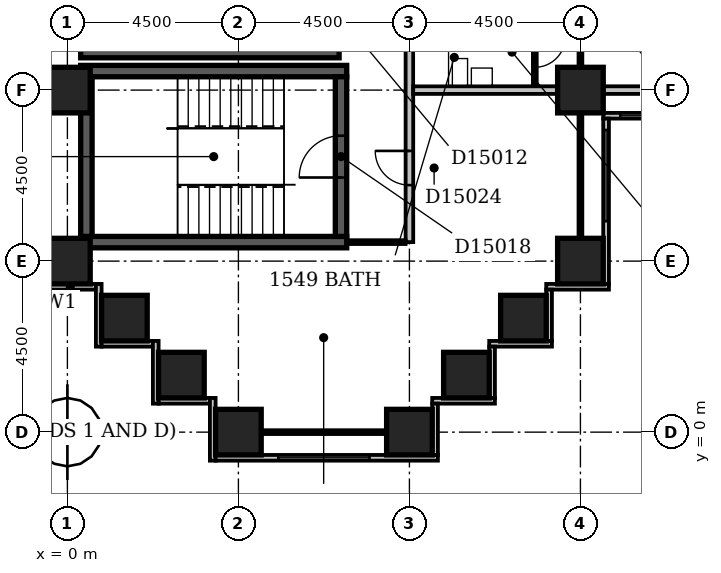
"""IFC4 building model, lengths in metres.
Left out: names, types, materials, properties, quantities, classifications, styles, units other than length and angle.
Written with IfcOpenShell. Run it as: python <this file> out.ifc"""

import sys

from ifc_helpers import new_model, si_unit, direction, frame, frame_2d, origin, origin_2d, place, context, subcontext, project, spatial, rectangle, extrude, element, fill, save


model = new_model("IFC4")
c1 = context("Model", 3, precision=1e-05, world=origin(), true_north=direction((0.0, 1.0)))
c2 = subcontext(c1, "Body", "Model", "MODEL_VIEW")
j1 = project(units=[si_unit("LENGTHUNIT", "METRE"), si_unit("PLANEANGLEUNIT", "RADIAN")], contexts=[c1])
p1 = place(None, origin())
s1 = spatial("IfcSite", under=j1, at=p1, CompositionType="ELEMENT")
p2 = place(p1, origin())
s2 = spatial("IfcBuilding", under=s1, at=p2, CompositionType="ELEMENT")
p3 = place(p2, frame((0.0, 0.0, 65.0)))
s3 = spatial("IfcBuildingStorey", under=s2, at=p3, CompositionType="ELEMENT", Elevation=65.0)
for number, where, z_axis, x_axis in (
    (1, (0.35, 5.0, -0.3), (0.0, 0.0, 1.0), (1.0, 0.0, 0.0)),
    (2, (0.35, 9.5, -0.3), (0.0, 0.0, 1.0), (1.0, 0.0, 0.0)),
):
    element("IfcWall", number, at=place(p3, frame(where, z_axis=z_axis, x_axis=x_axis)), inside=s3, PredefinedType="SHEAR", context=c2, shape_type="SweptSolid", body=[
        extrude(rectangle(XDim=7.0, YDim=0.3, at=frame_2d((3.5, 0.0))), origin(), (0.0, 0.0, 1.0), 3.6),
    ])
p4 = place(p3, frame((0.35, 10.0, -0.3), z_axis=(0.0, 0.0, 1.0), x_axis=(1.0, 0.0, 0.0)))
e3 = element("IfcWall", 3, at=p4, inside=s3, PredefinedType="SHEAR", context=c2, shape_type="SweptSolid", body=[
    extrude(rectangle(XDim=6.8, YDim=0.3, at=frame_2d((3.4, 0.0))), origin(), (0.0, 0.0, 1.0), 3.6),
])
p5 = place(p3, frame((0.5, 5.15, -0.3), z_axis=(0.0, 0.0, 1.0), x_axis=(0.0, 1.0, 0.0)))
e4 = element("IfcWall", 4, at=p5, inside=s3, PredefinedType="SHEAR", context=c2, shape_type="SweptSolid", body=[
    extrude(rectangle(XDim=4.2, YDim=0.3, at=frame_2d((2.1, 0.0))), origin(), (0.0, 0.0, 1.0), 3.6),
])
p6 = place(p3, frame((7.2, 5.15, -0.3), z_axis=(0.0, 0.0, 1.0), x_axis=(0.0, 1.0, 0.0)))
e5 = element("IfcWall", 5, at=p6, inside=s3, PredefinedType="SHEAR", context=c2, shape_type="SweptSolid", body=[
    extrude(rectangle(XDim=4.2, YDim=0.3, at=frame_2d((2.1, 0.0))), origin(), (0.0, 0.0, 1.0), 3.6),
])
p7 = place(p6, frame((1.55, 0.0, 0.3)))
e6 = element("IfcOpeningElement", 6, at=p7, cuts=e5, PredefinedType="OPENING", context=c2, shape_type="SweptSolid", body=[
    extrude(rectangle(XDim=1.1, YDim=2.1, at=frame_2d((0.55, 1.05))), frame((0.0, 0.162, 0.0), z_axis=(0.0, -1.0, 0.0), x_axis=(1.0, 0.0, 0.0)), (0.0, 0.0, 1.0), 0.324),
])
for number, where, z_axis, x_axis in (
    (7, (4.5, 0.0, -0.3), (0.0, 0.0, 1.0), (1.0, 0.0, 0.0)),
    (8, (9.0, 0.0, -0.3), (0.0, 0.0, 1.0), (1.0, 0.0, 0.0)),
    (9, (3.0, 1.5, -0.3), (0.0, 0.0, 1.0), (1.0, 0.0, 0.0)),
    (10, (10.5, 1.5, -0.3), (0.0, 0.0, 1.0), (1.0, 0.0, 0.0)),
    (11, (1.5, 3.0, -0.3), (0.0, 0.0, 1.0), (1.0, 0.0, 0.0)),
    (12, (12.0, 3.0, -0.3), (0.0, 0.0, 1.0), (1.0, 0.0, 0.0)),
    (13, (0.0, 4.5, -0.3), (0.0, 0.0, 1.0), (1.0, 0.0, 0.0)),
    (14, (13.5, 4.5, -0.3), (0.0, 0.0, 1.0), (1.0, 0.0, 0.0)),
    (15, (0.0, 9.0, -0.3), (0.0, 0.0, 1.0), (1.0, 0.0, 0.0)),
    (16, (13.5, 9.0, -0.3), (0.0, 0.0, 1.0), (1.0, 0.0, 0.0)),
):
    element("IfcColumn", number, at=place(p3, frame(where, z_axis=z_axis, x_axis=x_axis)), inside=s3, PredefinedType="COLUMN", context=c2, shape_type="SweptSolid", body=[
        extrude(rectangle(XDim=1.2, YDim=1.2, at=origin_2d()), origin(), (0.0, 0.0, 1.0), 3.6),
    ])
p8 = place(p3, frame((9.675, -0.6, 0.0), z_axis=(0.0, 0.0, 1.0), x_axis=(0.0, 1.0, 0.0)))
e17 = element("IfcWall", 17, at=p8, inside=s3, PredefinedType="STANDARD", context=c2, shape_type="SweptSolid", body=[
    extrude(rectangle(XDim=1.35, YDim=0.15, at=frame_2d((0.675, 0.0))), origin(), (0.0, 0.0, 1.0), 2.7),
])
p9 = place(p3, frame((9.6, 0.825, 0.0), z_axis=(0.0, 0.0, 1.0), x_axis=(1.0, 0.0, 0.0)))
e18 = element("IfcWall", 18, at=p9, inside=s3, PredefinedType="STANDARD", context=c2, shape_type="SweptSolid", body=[
    extrude(rectangle(XDim=1.65, YDim=0.15, at=frame_2d((0.825, 0.0))), origin(), (0.0, 0.0, 1.0), 2.7),
])
p10 = place(p3, frame((11.175, 0.9, 0.0), z_axis=(0.0, 0.0, 1.0), x_axis=(0.0, 1.0, 0.0)))
e19 = element("IfcWall", 19, at=p10, inside=s3, PredefinedType="STANDARD", context=c2, shape_type="SweptSolid", body=[
    extrude(rectangle(XDim=1.35, YDim=0.15, at=frame_2d((0.675, 0.0))), origin(), (0.0, 0.0, 1.0), 2.7),
])
p11 = place(p3, frame((11.1, 2.325, 0.0), z_axis=(0.0, 0.0, 1.0), x_axis=(1.0, 0.0, 0.0)))
e20 = element("IfcWall", 20, at=p11, inside=s3, PredefinedType="STANDARD", context=c2, shape_type="SweptSolid", body=[
    extrude(rectangle(XDim=1.65, YDim=0.15, at=frame_2d((0.825, 0.0))), origin(), (0.0, 0.0, 1.0), 2.7),
])
p12 = place(p3, frame((12.675, 2.4, 0.0), z_axis=(0.0, 0.0, 1.0), x_axis=(0.0, 1.0, 0.0)))
e21 = element("IfcWall", 21, at=p12, inside=s3, PredefinedType="STANDARD", context=c2, shape_type="SweptSolid", body=[
    extrude(rectangle(XDim=1.35, YDim=0.15, at=frame_2d((0.675, 0.0))), origin(), (0.0, 0.0, 1.0), 2.7),
])
p13 = place(p3, frame((12.6, 3.825, 0.0), z_axis=(0.0, 0.0, 1.0), x_axis=(1.0, 0.0, 0.0)))
e22 = element("IfcWall", 22, at=p13, inside=s3, PredefinedType="STANDARD", context=c2, shape_type="SweptSolid", body=[
    extrude(rectangle(XDim=1.65, YDim=0.15, at=frame_2d((0.825, 0.0))), origin(), (0.0, 0.0, 1.0), 2.7),
])
p14 = place(p3, frame((14.175, 3.9, 0.0), z_axis=(0.0, 0.0, 1.0), x_axis=(0.0, 1.0, 0.0)))
e23 = element("IfcWall", 23, at=p14, inside=s3, PredefinedType="STANDARD", context=c2, shape_type="SweptSolid", body=[
    extrude(rectangle(XDim=4.35, YDim=0.15, at=frame_2d((2.175, 0.0))), origin(), (0.0, 0.0, 1.0), 2.7),
])
p15 = place(p14, frame((1.65, 0.0, 0.6)))
e24 = element("IfcOpeningElement", 24, at=p15, cuts=e23, PredefinedType="OPENING", context=c2, shape_type="SweptSolid", body=[
    extrude(rectangle(XDim=2.4, YDim=1.8, at=frame_2d((1.2, 0.9))), frame((0.0, 0.087, 0.0), z_axis=(0.0, -1.0, 0.0), x_axis=(1.0, 0.0, 0.0)), (0.0, 0.0, 1.0), 0.174),
])
p16 = place(p3, frame((14.1, 8.325, 0.0), z_axis=(0.0, 0.0, 1.0), x_axis=(1.0, 0.0, 0.0)))
e25 = element("IfcWall", 25, at=p16, inside=s3, PredefinedType="STANDARD", context=c2, shape_type="SweptSolid", body=[
    extrude(rectangle(XDim=4.65, YDim=0.15, at=frame_2d((2.325, 0.0))), origin(), (0.0, 0.0, 1.0), 2.7),
])
p17 = place(p16, frame((0.45, 0.0, 0.6)))
e26 = element("IfcOpeningElement", 26, at=p17, cuts=e25, PredefinedType="OPENING", context=c2, shape_type="SweptSolid", body=[
    extrude(rectangle(XDim=2.4, YDim=1.8, at=frame_2d((1.2, 0.9))), frame((0.0, 0.087, 0.0), z_axis=(0.0, -1.0, 0.0), x_axis=(1.0, 0.0, 0.0)), (0.0, 0.0, 1.0), 0.174),
])
p18 = place(p3, frame((-0.6, 3.825, 0.0), z_axis=(0.0, 0.0, 1.0), x_axis=(1.0, 0.0, 0.0)))
e27 = element("IfcWall", 27, at=p18, inside=s3, PredefinedType="STANDARD", context=c2, shape_type="SweptSolid", body=[
    extrude(rectangle(XDim=1.35, YDim=0.15, at=frame_2d((0.675, 0.0))), origin(), (0.0, 0.0, 1.0), 2.7),
])
p19 = place(p3, frame((0.825, 3.9, 0.0), z_axis=(0.0, 0.0, 1.0), x_axis=(0.0, -1.0, 0.0)))
e28 = element("IfcWall", 28, at=p19, inside=s3, PredefinedType="STANDARD", context=c2, shape_type="SweptSolid", body=[
    extrude(rectangle(XDim=1.65, YDim=0.15, at=frame_2d((0.825, 0.0))), origin(), (0.0, 0.0, 1.0), 2.7),
])
p20 = place(p3, frame((0.9, 2.325, 0.0), z_axis=(0.0, 0.0, 1.0), x_axis=(1.0, 0.0, 0.0)))
e29 = element("IfcWall", 29, at=p20, inside=s3, PredefinedType="STANDARD", context=c2, shape_type="SweptSolid", body=[
    extrude(rectangle(XDim=1.35, YDim=0.15, at=frame_2d((0.675, 0.0))), origin(), (0.0, 0.0, 1.0), 2.7),
])
p21 = place(p3, frame((2.325, 2.4, 0.0), z_axis=(0.0, 0.0, 1.0), x_axis=(0.0, -1.0, 0.0)))
e30 = element("IfcWall", 30, at=p21, inside=s3, PredefinedType="STANDARD", context=c2, shape_type="SweptSolid", body=[
    extrude(rectangle(XDim=1.65, YDim=0.15, at=frame_2d((0.825, 0.0))), origin(), (0.0, 0.0, 1.0), 2.7),
])
p22 = place(p3, frame((2.4, 0.825, 0.0), z_axis=(0.0, 0.0, 1.0), x_axis=(1.0, 0.0, 0.0)))
e31 = element("IfcWall", 31, at=p22, inside=s3, PredefinedType="STANDARD", context=c2, shape_type="SweptSolid", body=[
    extrude(rectangle(XDim=1.35, YDim=0.15, at=frame_2d((0.675, 0.0))), origin(), (0.0, 0.0, 1.0), 2.7),
])
p23 = place(p3, frame((3.825, 0.9, 0.0), z_axis=(0.0, 0.0, 1.0), x_axis=(0.0, -1.0, 0.0)))
e32 = element("IfcWall", 32, at=p23, inside=s3, PredefinedType="STANDARD", context=c2, shape_type="SweptSolid", body=[
    extrude(rectangle(XDim=1.65, YDim=0.15, at=frame_2d((0.825, 0.0))), origin(), (0.0, 0.0, 1.0), 2.7),
])
p24 = place(p3, frame((3.9, -0.675, 0.0), z_axis=(0.0, 0.0, 1.0), x_axis=(1.0, 0.0, 0.0)))
e33 = element("IfcWall", 33, at=p24, inside=s3, PredefinedType="STANDARD", context=c2, shape_type="SweptSolid", body=[
    extrude(rectangle(XDim=5.85, YDim=0.15, at=frame_2d((2.925, 0.0))), origin(), (0.0, 0.0, 1.0), 2.7),
])
p25 = place(p24, frame((1.65, 0.0, 0.6)))
e34 = element("IfcOpeningElement", 34, at=p25, cuts=e33, PredefinedType="OPENING", context=c2, shape_type="SweptSolid", body=[
    extrude(rectangle(XDim=2.4, YDim=1.8, at=frame_2d((1.2, 0.9))), frame((0.0, 0.087, 0.0), z_axis=(0.0, -1.0, 0.0), x_axis=(1.0, 0.0, 0.0)), (0.0, 0.0, 1.0), 0.174),
])
p26 = place(p3, frame((5.1, 0.0, 0.0), z_axis=(0.0, 0.0, 1.0), x_axis=(1.0, 0.0, 0.0)))
e35 = element("IfcWall", 35, at=p26, inside=s3, PredefinedType="PARTITIONING", context=c2, shape_type="SweptSolid", body=[
    extrude(rectangle(XDim=3.3, YDim=0.1, at=frame_2d((1.65, 0.0))), origin(), (0.0, 0.0, 1.0), 2.7),
])
p27 = place(p3, frame((0.0, 4.4, 0.0), z_axis=(0.0, 0.0, 1.0), x_axis=(0.0, 1.0, 0.0)))
e36 = element("IfcWall", 36, at=p27, inside=s3, PredefinedType="PARTITIONING", context=c2, shape_type="SweptSolid", body=[
    extrude(rectangle(XDim=0.7, YDim=0.1, at=frame_2d((0.35, 0.0))), origin(), (0.0, 0.0, 1.0), 2.7),
])
p28 = place(p3, frame((7.349, 5.0, 0.0), z_axis=(0.0, 0.0, 1.0), x_axis=(1.0, 0.0, 0.0)))
e37 = element("IfcWall", 37, at=p28, inside=s3, PredefinedType="PARTITIONING", context=c2, shape_type="SweptSolid", body=[
    extrude(rectangle(XDim=1.551, YDim=0.1, at=frame_2d((0.775, 0.0))), origin(), (0.0, 0.0, 1.0), 3.3),
])
p29 = place(p3, frame((9.0, 5.0, 0.0), z_axis=(0.0, 0.0, 1.0), x_axis=(0.0, 1.0, 0.0)))
e38 = element("IfcWall", 38, at=p29, inside=s3, PredefinedType="PARTITIONING", context=c2, shape_type="SweptSolid", body=[
    extrude(rectangle(XDim=44.5, YDim=0.2, at=frame_2d((22.25, 0.0))), origin(), (0.0, 0.0, 1.0), 3.3),
])
p30 = place(p29, frame((22.3, 0.0, 0.0)))
e39 = element("IfcOpeningElement", 39, at=p30, cuts=e38, PredefinedType="OPENING", context=c2, shape_type="SweptSolid", body=[
    extrude(rectangle(XDim=1.0, YDim=2.1, at=frame_2d((0.5, 1.05))), frame((0.0, 0.112, 0.0), z_axis=(0.0, -1.0, 0.0), x_axis=(1.0, 0.0, 0.0)), (0.0, 0.0, 1.0), 0.224),
])
p31 = place(p29, frame((15.7, 0.0, 0.0)))
e40 = element("IfcOpeningElement", 40, at=p31, cuts=e38, PredefinedType="OPENING", context=c2, shape_type="SweptSolid", body=[
    extrude(rectangle(XDim=1.0, YDim=2.1, at=frame_2d((0.5, 1.05))), frame((0.0, 0.112, 0.0), z_axis=(0.0, -1.0, 0.0), x_axis=(1.0, 0.0, 0.0)), (0.0, 0.0, 1.0), 0.224),
])
p32 = place(p29, frame((10.45, 0.0, 0.0)))
e41 = element("IfcOpeningElement", 41, at=p32, cuts=e38, PredefinedType="OPENING", context=c2, shape_type="SweptSolid", body=[
    extrude(rectangle(XDim=1.0, YDim=2.1, at=frame_2d((0.5, 1.05))), frame((0.0, 0.112, 0.0), z_axis=(0.0, -1.0, 0.0), x_axis=(1.0, 0.0, 0.0)), (0.0, 0.0, 1.0), 0.224),
])
p33 = place(p29, frame((5.95, 0.0, 0.0)))
e42 = element("IfcOpeningElement", 42, at=p33, cuts=e38, PredefinedType="OPENING", context=c2, shape_type="SweptSolid", body=[
    extrude(rectangle(XDim=1.0, YDim=2.1, at=frame_2d((0.5, 1.05))), frame((0.0, 0.112, 0.0), z_axis=(0.0, -1.0, 0.0), x_axis=(1.0, 0.0, 0.0)), (0.0, 0.0, 1.0), 0.224),
])
p34 = place(p29, frame((37.25, 0.0, 0.0)))
e43 = element("IfcOpeningElement", 43, at=p34, cuts=e38, PredefinedType="OPENING", context=c2, shape_type="SweptSolid", body=[
    extrude(rectangle(XDim=0.9, YDim=2.1, at=frame_2d((0.45, 1.05))), frame((0.0, 0.112, 0.0), z_axis=(0.0, -1.0, 0.0), x_axis=(1.0, 0.0, 0.0)), (0.0, 0.0, 1.0), 0.224),
])
p35 = place(p29, frame((1.5, 0.0, 0.0)))
e44 = element("IfcOpeningElement", 44, at=p35, cuts=e38, PredefinedType="OPENING", context=c2, shape_type="SweptSolid", body=[
    extrude(rectangle(XDim=0.9, YDim=2.1, at=frame_2d((0.45, 1.05))), frame((0.0, 0.112, 0.0), z_axis=(0.0, -1.0, 0.0), x_axis=(1.0, 0.0, 0.0)), (0.0, 0.0, 1.0), 0.224),
])
p36 = place(p3, frame((13.5, 5.1, 0.0), z_axis=(0.0, 0.0, 1.0), x_axis=(0.0, 1.0, 0.0)))
e45 = element("IfcWall", 45, at=p36, inside=s3, PredefinedType="PARTITIONING", context=c2, shape_type="SweptSolid", body=[
    extrude(rectangle(XDim=3.3, YDim=0.1, at=frame_2d((1.65, 0.0))), origin(), (0.0, 0.0, 1.0), 2.7),
])
p37 = place(p3, frame((9.1, 9.0, 0.0), z_axis=(0.0, 0.0, 1.0), x_axis=(1.0, 0.0, 0.0)))
e46 = element("IfcWall", 46, at=p37, inside=s3, PredefinedType="PARTITIONING", context=c2, shape_type="SweptSolid", body=[
    extrude(rectangle(XDim=3.8, YDim=0.2, at=frame_2d((1.9, 0.0))), origin(), (0.0, 0.0, 1.0), 3.3),
])
p38 = place(p3, frame((14.1, 9.0, 0.0), z_axis=(0.0, 0.0, 1.0), x_axis=(1.0, 0.0, 0.0)))
e47 = element("IfcWall", 47, at=p38, inside=s3, PredefinedType="PARTITIONING", context=c2, shape_type="SweptSolid", body=[
    extrude(rectangle(XDim=3.3, YDim=0.2, at=frame_2d((1.65, 0.0))), origin(), (0.0, 0.0, 1.0), 2.7),
])
p39 = place(p3, frame((12.3, 9.1, 0.0), z_axis=(0.0, 0.0, 1.0), x_axis=(0.0, 1.0, 0.0)))
e48 = element("IfcWall", 48, at=p39, inside=s3, PredefinedType="PARTITIONING", context=c2, shape_type="SweptSolid", body=[
    extrude(rectangle(XDim=1.6, YDim=0.1, at=frame_2d((0.8, 0.0))), origin(), (0.0, 0.0, 1.0), 3.3),
])
p40 = place(p39, frame((0.5, 0.0, 0.0)))
e49 = element("IfcOpeningElement", 49, at=p40, cuts=e48, PredefinedType="OPENING", context=c2, shape_type="SweptSolid", body=[
    extrude(rectangle(XDim=0.8, YDim=2.1, at=frame_2d((0.4, 1.05))), frame((0.0, 0.062, 0.0), z_axis=(0.0, -1.0, 0.0), x_axis=(1.0, 0.0, 0.0)), (0.0, 0.0, 1.0), 0.124),
])
p41 = place(p3, frame((13.5, 9.6, 0.0), z_axis=(0.0, 0.0, 1.0), x_axis=(0.0, 1.0, 0.0)))
e50 = element("IfcWall", 50, at=p41, inside=s3, PredefinedType="PARTITIONING", context=c2, shape_type="SweptSolid", body=[
    extrude(rectangle(XDim=8.3, YDim=0.1, at=frame_2d((4.15, 0.0))), origin(), (0.0, 0.0, 1.0), 3.3),
])
p42 = place(p41, frame((5.7, 0.0, 0.0)))
e51 = element("IfcOpeningElement", 51, at=p42, cuts=e50, PredefinedType="OPENING", context=c2, shape_type="SweptSolid", body=[
    extrude(rectangle(XDim=0.9, YDim=2.1, at=frame_2d((0.45, 1.05))), frame((0.0, 0.062, 0.0), z_axis=(0.0, -1.0, 0.0), x_axis=(1.0, 0.0, 0.0)), (0.0, 0.0, 1.0), 0.124),
])
p43 = place(p41, frame((1.2, 0.0, 0.0)))
e52 = element("IfcOpeningElement", 52, at=p43, cuts=e50, PredefinedType="OPENING", context=c2, shape_type="SweptSolid", body=[
    extrude(rectangle(XDim=0.9, YDim=2.1, at=frame_2d((0.45, 1.05))), frame((0.0, 0.062, 0.0), z_axis=(0.0, -1.0, 0.0), x_axis=(1.0, 0.0, 0.0)), (0.0, 0.0, 1.0), 0.124),
])
p44 = place(p15, origin())
e53 = element("IfcWindow", 53, at=p44, inside=s3, PartitioningType="SINGLE_PANEL", PredefinedType="WINDOW", context=c2, shape_type="SweptSolid", body=[
    extrude(rectangle(XDim=2.4, YDim=1.8, at=frame_2d((1.2, 0.9))), frame((0.0, 0.03, 0.0), z_axis=(0.0, -1.0, 0.0), x_axis=(1.0, 0.0, 0.0)), (0.0, 0.0, 1.0), 0.06),
])
fill(e24, e53)
p45 = place(p17, origin())
e54 = element("IfcWindow", 54, at=p45, inside=s3, PartitioningType="SINGLE_PANEL", PredefinedType="WINDOW", context=c2, shape_type="SweptSolid", body=[
    extrude(rectangle(XDim=2.4, YDim=1.8, at=frame_2d((1.2, 0.9))), frame((0.0, 0.03, 0.0), z_axis=(0.0, -1.0, 0.0), x_axis=(1.0, 0.0, 0.0)), (0.0, 0.0, 1.0), 0.06),
])
fill(e26, e54)
p46 = place(p25, origin())
e55 = element("IfcWindow", 55, at=p46, inside=s3, PartitioningType="SINGLE_PANEL", PredefinedType="WINDOW", context=c2, shape_type="SweptSolid", body=[
    extrude(rectangle(XDim=2.4, YDim=1.8, at=frame_2d((1.2, 0.9))), frame((0.0, 0.03, 0.0), z_axis=(0.0, -1.0, 0.0), x_axis=(1.0, 0.0, 0.0)), (0.0, 0.0, 1.0), 0.06),
])
fill(e34, e55)
p47 = place(p7, origin())
e56 = element("IfcDoor", 56, at=p47, inside=s3, OperationType="SINGLE_SWING_LEFT", PredefinedType="DOOR", context=c2, shape_type="SweptSolid", body=[
    extrude(rectangle(XDim=1.1, YDim=2.1, at=frame_2d((0.55, 1.05))), frame((0.0, 0.025, 0.0), z_axis=(0.0, -1.0, 0.0), x_axis=(1.0, 0.0, 0.0)), (0.0, 0.0, 1.0), 0.05),
])
fill(e6, e56)
p48 = place(p35, frame((0.9, 0.0, 0.0), z_axis=(0.0, 0.0, 1.0), x_axis=(-1.0, 0.0, 0.0)))
e57 = element("IfcDoor", 57, at=p48, inside=s3, OperationType="SINGLE_SWING_LEFT", PredefinedType="DOOR", context=c2, shape_type="SweptSolid", body=[
    extrude(rectangle(XDim=0.9, YDim=2.1, at=frame_2d((0.45, 1.05))), frame((0.0, 0.025, 0.0), z_axis=(0.0, -1.0, 0.0), x_axis=(1.0, 0.0, 0.0)), (0.0, 0.0, 1.0), 0.05),
])
fill(e44, e57)
p49 = place(p40, origin())
e58 = element("IfcDoor", 58, at=p49, inside=s3, OperationType="SINGLE_SWING_RIGHT", PredefinedType="DOOR", context=c2, shape_type="SweptSolid", body=[
    extrude(rectangle(XDim=0.8, YDim=2.1, at=frame_2d((0.4, 1.05))), frame((0.0, 0.025, 0.0), z_axis=(0.0, -1.0, 0.0), x_axis=(1.0, 0.0, 0.0)), (0.0, 0.0, 1.0), 0.05),
])
fill(e49, e58)
save(model, sys.argv[1])
